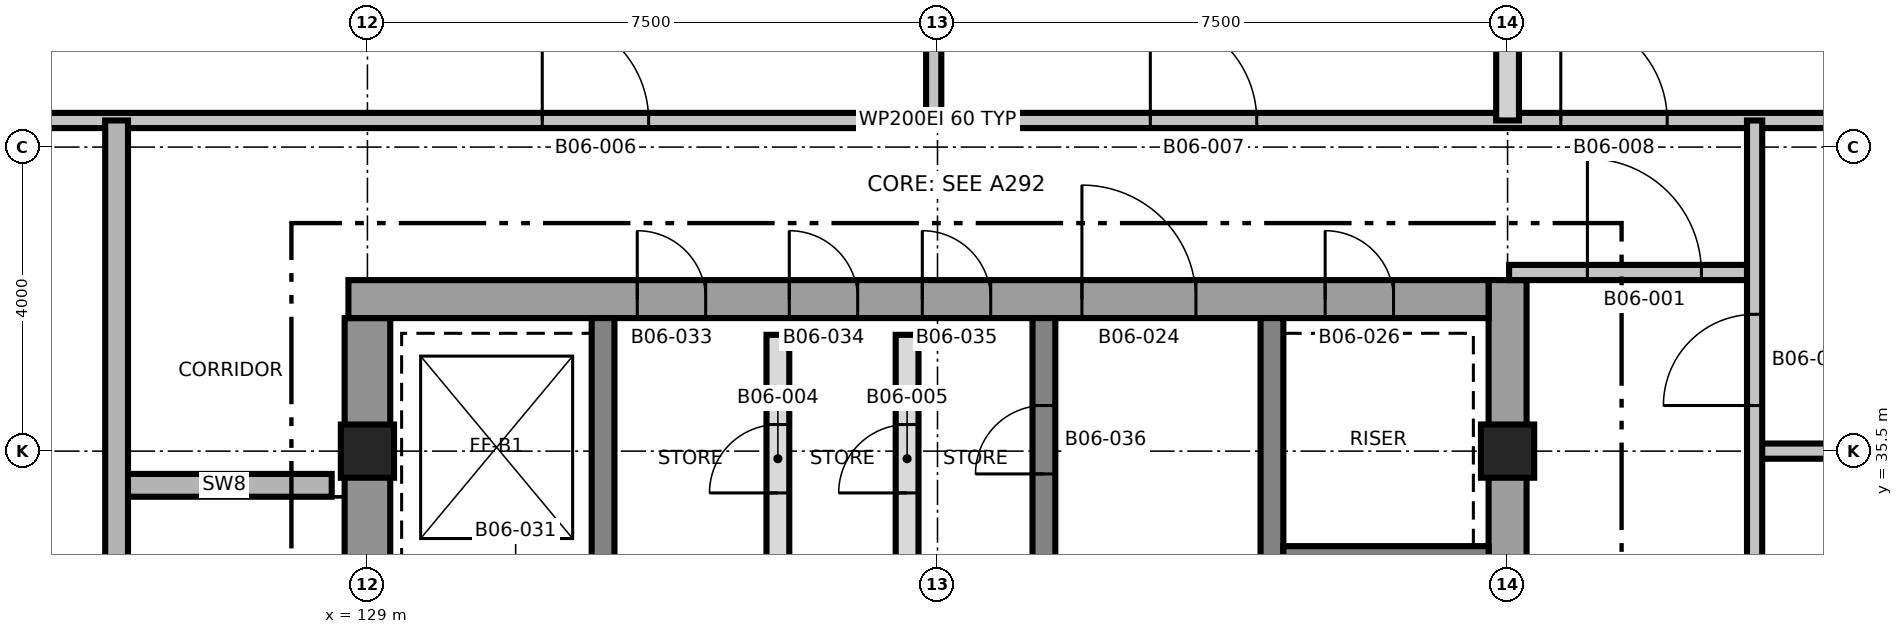
"""IFC4 building model, lengths in metres.
Left out: names, types, materials, properties, quantities, classifications, styles, units other than length and angle.
Written with IfcOpenShell. Run it as: python <this file> out.ifc"""

import sys

from ifc_helpers import new_model, si_unit, direction, frame, frame_2d, origin, origin_2d, place, context, subcontext, project, spatial, rectangle, extrude, element, fill, save


model = new_model("IFC4")
c1 = context("Model", 3, precision=1e-05, world=origin(), true_north=direction((0.0, 1.0)))
c2 = subcontext(c1, "Body", "Model", "MODEL_VIEW")
j1 = project(units=[si_unit("LENGTHUNIT", "METRE"), si_unit("PLANEANGLEUNIT", "RADIAN")], contexts=[c1])
p1 = place(None, origin())
s1 = spatial("IfcSite", under=j1, at=p1, CompositionType="ELEMENT")
p2 = place(p1, origin())
s2 = spatial("IfcBuilding", under=s1, at=p2, CompositionType="ELEMENT")
p3 = place(p2, frame((0.0, 0.0, 81.6)))
s3 = spatial("IfcBuildingStorey", under=s2, at=p3, CompositionType="ELEMENT", Elevation=81.6)
p4 = place(p3, frame((129.0, 24.75, 0.0), z_axis=(0.0, 0.0, 1.0), x_axis=(0.0, 1.0, 0.0)))
e1 = element("IfcWall", 1, at=p4, inside=s3, PredefinedType="SHEAR", context=c2, shape_type="SweptSolid", body=[
    extrude(rectangle(XDim=12.5, YDim=0.6, at=frame_2d((6.25, 0.0))), origin(), (0.0, 0.0, 1.0), 5.5),
])
p5 = place(p4, frame((5.15, 0.0, 0.0)))
e2 = element("IfcOpeningElement", 2, at=p5, cuts=e1, PredefinedType="OPENING", context=c2, shape_type="SweptSolid", body=[
    extrude(rectangle(XDim=1.0, YDim=2.1, at=frame_2d((0.5, 1.05))), frame((0.0, 0.31, 0.0), z_axis=(0.0, -1.0, 0.0), x_axis=(1.0, 0.0, 0.0)), (0.0, 0.0, 1.0), 0.62),
])
p6 = place(p3, frame((144.0, 24.25, 0.0), z_axis=(0.0, 0.0, 1.0), x_axis=(0.0, 1.0, 0.0)))
e3 = element("IfcWall", 3, at=p6, inside=s3, PredefinedType="SHEAR", context=c2, shape_type="SweptSolid", body=[
    extrude(rectangle(XDim=13.5, YDim=0.5, at=frame_2d((6.75, 0.0))), origin(), (0.0, 0.0, 1.0), 5.5),
])
p7 = place(p3, frame((128.75, 37.5, 0.0), z_axis=(0.0, 0.0, 1.0), x_axis=(1.0, 0.0, 0.0)))
e4 = element("IfcWall", 4, at=p7, inside=s3, PredefinedType="SHEAR", context=c2, shape_type="SweptSolid", body=[
    extrude(rectangle(XDim=15.0, YDim=0.5, at=frame_2d((7.5, 0.0))), origin(), (0.0, 0.0, 1.0), 5.5),
])
p8 = place(p7, frame((9.65, 0.0, 0.0)))
e5 = element("IfcOpeningElement", 5, at=p8, cuts=e4, PredefinedType="OPENING", context=c2, shape_type="SweptSolid", body=[
    extrude(rectangle(XDim=1.5, YDim=2.1, at=frame_2d((0.75, 1.05))), frame((0.0, 0.26, 0.0), z_axis=(0.0, -1.0, 0.0), x_axis=(1.0, 0.0, 0.0)), (0.0, 0.0, 1.0), 0.52),
])
p9 = place(p7, frame((12.85, 0.0, 0.0)))
e6 = element("IfcOpeningElement", 6, at=p9, cuts=e4, PredefinedType="OPENING", context=c2, shape_type="SweptSolid", body=[
    extrude(rectangle(XDim=0.9, YDim=2.1, at=frame_2d((0.45, 1.05))), frame((0.0, 0.26, 0.0), z_axis=(0.0, -1.0, 0.0), x_axis=(1.0, 0.0, 0.0)), (0.0, 0.0, 1.0), 0.52),
])
p10 = place(p7, frame((3.8, 0.0, 0.0)))
e7 = element("IfcOpeningElement", 7, at=p10, cuts=e4, PredefinedType="OPENING", context=c2, shape_type="SweptSolid", body=[
    extrude(rectangle(XDim=0.9, YDim=2.1, at=frame_2d((0.45, 1.05))), frame((0.0, 0.26, 0.0), z_axis=(0.0, -1.0, 0.0), x_axis=(1.0, 0.0, 0.0)), (0.0, 0.0, 1.0), 0.52),
])
p11 = place(p7, frame((5.8, 0.0, 0.0)))
e8 = element("IfcOpeningElement", 8, at=p11, cuts=e4, PredefinedType="OPENING", context=c2, shape_type="SweptSolid", body=[
    extrude(rectangle(XDim=0.9, YDim=2.1, at=frame_2d((0.45, 1.05))), frame((0.0, 0.26, 0.0), z_axis=(0.0, -1.0, 0.0), x_axis=(1.0, 0.0, 0.0)), (0.0, 0.0, 1.0), 0.52),
])
p12 = place(p7, frame((7.55, 0.0, 0.0)))
e9 = element("IfcOpeningElement", 9, at=p12, cuts=e4, PredefinedType="OPENING", context=c2, shape_type="SweptSolid", body=[
    extrude(rectangle(XDim=0.9, YDim=2.1, at=frame_2d((0.45, 1.05))), frame((0.0, 0.26, 0.0), z_axis=(0.0, -1.0, 0.0), x_axis=(1.0, 0.0, 0.0)), (0.0, 0.0, 1.0), 0.52),
])
p13 = place(p3, frame((132.1, 24.75, 0.0), z_axis=(0.0, 0.0, 1.0), x_axis=(0.0, 1.0, 0.0)))
e10 = element("IfcWall", 10, at=p13, inside=s3, PredefinedType="SHEAR", context=c2, shape_type="SweptSolid", body=[
    extrude(rectangle(XDim=12.5, YDim=0.3, at=frame_2d((6.25, 0.0))), origin(), (0.0, 0.0, 1.0), 5.5),
])
p14 = place(p13, frame((3.9, 0.0, 0.0)))
e11 = element("IfcOpeningElement", 11, at=p14, cuts=e10, PredefinedType="OPENING", context=c2, shape_type="SweptSolid", body=[
    extrude(rectangle(XDim=1.2, YDim=2.1, at=frame_2d((0.6, 1.05))), frame((0.0, 0.16, 0.0), z_axis=(0.0, -1.0, 0.0), x_axis=(1.0, 0.0, 0.0)), (0.0, 0.0, 1.0), 0.32),
])
p15 = place(p3, frame((137.9, 24.75, 0.0), z_axis=(0.0, 0.0, 1.0), x_axis=(0.0, 1.0, 0.0)))
e12 = element("IfcWall", 12, at=p15, inside=s3, PredefinedType="SHEAR", context=c2, shape_type="SweptSolid", body=[
    extrude(rectangle(XDim=12.5, YDim=0.3, at=frame_2d((6.25, 0.0))), origin(), (0.0, 0.0, 1.0), 5.5),
])
p16 = place(p15, frame((3.95, 0.0, 0.0)))
e13 = element("IfcOpeningElement", 13, at=p16, cuts=e12, PredefinedType="OPENING", context=c2, shape_type="SweptSolid", body=[
    extrude(rectangle(XDim=1.5, YDim=2.1, at=frame_2d((0.75, 1.05))), frame((0.0, 0.16, 0.0), z_axis=(0.0, -1.0, 0.0), x_axis=(1.0, 0.0, 0.0)), (0.0, 0.0, 1.0), 0.32),
])
p17 = place(p15, frame((10.45, 0.0, 0.0)))
e14 = element("IfcOpeningElement", 14, at=p17, cuts=e12, PredefinedType="OPENING", context=c2, shape_type="SweptSolid", body=[
    extrude(rectangle(XDim=0.9, YDim=2.1, at=frame_2d((0.45, 1.05))), frame((0.0, 0.16, 0.0), z_axis=(0.0, -1.0, 0.0), x_axis=(1.0, 0.0, 0.0)), (0.0, 0.0, 1.0), 0.32),
])
p18 = place(p3, frame((140.9, 24.75, 0.0), z_axis=(0.0, 0.0, 1.0), x_axis=(0.0, 1.0, 0.0)))
e15 = element("IfcWall", 15, at=p18, inside=s3, PredefinedType="SHEAR", context=c2, shape_type="SweptSolid", body=[
    extrude(rectangle(XDim=12.5, YDim=0.3, at=frame_2d((6.25, 0.0))), origin(), (0.0, 0.0, 1.0), 5.5),
])
p19 = place(p18, frame((5.9, 0.0, 0.0)))
e16 = element("IfcOpeningElement", 16, at=p19, cuts=e15, PredefinedType="OPENING", context=c2, shape_type="SweptSolid", body=[
    extrude(rectangle(XDim=1.2, YDim=2.1, at=frame_2d((0.6, 1.05))), frame((0.0, 0.16, 0.0), z_axis=(0.0, -1.0, 0.0), x_axis=(1.0, 0.0, 0.0)), (0.0, 0.0, 1.0), 0.32),
])
p20 = place(p3, frame((141.05, 34.1, 0.0), z_axis=(0.0, 0.0, 1.0), x_axis=(1.0, 0.0, 0.0)))
e17 = element("IfcWall", 17, at=p20, inside=s3, PredefinedType="SHEAR", context=c2, shape_type="SweptSolid", body=[
    extrude(rectangle(XDim=2.7, YDim=0.3, at=frame_2d((1.35, 0.0))), origin(), (0.0, 0.0, 1.0), 5.5),
])
for number, where, z_axis, x_axis in (
    (18, (129.0, 35.5, 0.0), (0.0, 0.0, 1.0), (1.0, 0.0, 0.0)),
    (19, (144.0, 35.5, 0.0), (0.0, 0.0, 1.0), (1.0, 0.0, 0.0)),
):
    element("IfcColumn", number, at=place(p3, frame(where, z_axis=z_axis, x_axis=x_axis)), inside=s3, PredefinedType="COLUMN", context=c2, shape_type="SweptSolid", body=[
        extrude(rectangle(XDim=0.7, YDim=0.7, at=origin_2d()), origin(), (0.0, 0.0, 1.0), 5.5),
    ])
p21 = place(p3, frame((125.7, 35.05, 0.0), z_axis=(0.0, 0.0, 1.0), x_axis=(1.0, 0.0, 0.0)))
e20 = element("IfcWall", 20, at=p21, inside=s3, PredefinedType="SHEAR", context=c2, shape_type="SweptSolid", body=[
    extrude(rectangle(XDim=2.83, YDim=0.3, at=frame_2d((1.415, 0.0))), origin(), (0.0, 0.0, 1.0), 5.2),
])
p22 = place(p3, frame((147.25, 35.5, 0.0), z_axis=(0.0, 0.0, 1.0), x_axis=(1.0, 0.0, 0.0)))
e21 = element("IfcWall", 21, at=p22, inside=s3, PredefinedType="PARTITIONING", context=c2, shape_type="SweptSolid", body=[
    extrude(rectangle(XDim=5.68, YDim=0.2, at=frame_2d((2.84, 0.0))), origin(), (0.0, 0.0, 1.0), 5.2),
])
p23 = place(p3, frame((144.02, 37.85, 0.0), z_axis=(0.0, 0.0, 1.0), x_axis=(1.0, 0.0, 0.0)))
e22 = element("IfcWall", 22, at=p23, inside=s3, PredefinedType="PARTITIONING", context=c2, shape_type="SweptSolid", body=[
    extrude(rectangle(XDim=3.23, YDim=0.2, at=frame_2d((1.615, 0.0))), origin(), (0.0, 0.0, 1.0), 5.2),
])
p24 = place(p23, frame((1.03, 0.0, 0.0)))
e23 = element("IfcOpeningElement", 23, at=p24, cuts=e22, PredefinedType="OPENING", context=c2, shape_type="SweptSolid", body=[
    extrude(rectangle(XDim=1.5, YDim=2.1, at=frame_2d((0.75, 1.05))), frame((0.0, 0.11, 0.0), z_axis=(0.0, -1.0, 0.0), x_axis=(1.0, 0.0, 0.0)), (0.0, 0.0, 1.0), 0.22),
])
p25 = place(p3, frame((120.07, 39.85, 0.0), z_axis=(0.0, 0.0, 1.0), x_axis=(1.0, 0.0, 0.0)))
e24 = element("IfcWall", 24, at=p25, inside=s3, PredefinedType="PARTITIONING", context=c2, shape_type="SweptSolid", body=[
    extrude(rectangle(XDim=32.86, YDim=0.2, at=frame_2d((16.43, 0.0))), origin(), (0.0, 0.0, 1.0), 5.2),
])
p26 = place(p25, frame((11.23, 0.0, 0.0)))
e25 = element("IfcOpeningElement", 25, at=p26, cuts=e24, PredefinedType="OPENING", context=c2, shape_type="SweptSolid", body=[
    extrude(rectangle(XDim=1.4, YDim=2.1, at=frame_2d((0.7, 1.05))), frame((0.0, 0.11, 0.0), z_axis=(0.0, -1.0, 0.0), x_axis=(1.0, 0.0, 0.0)), (0.0, 0.0, 1.0), 0.22),
])
p27 = place(p25, frame((19.23, 0.0, 0.0)))
e26 = element("IfcOpeningElement", 26, at=p27, cuts=e24, PredefinedType="OPENING", context=c2, shape_type="SweptSolid", body=[
    extrude(rectangle(XDim=1.4, YDim=2.1, at=frame_2d((0.7, 1.05))), frame((0.0, 0.11, 0.0), z_axis=(0.0, -1.0, 0.0), x_axis=(1.0, 0.0, 0.0)), (0.0, 0.0, 1.0), 0.22),
])
p28 = place(p25, frame((24.63, 0.0, 0.0)))
e27 = element("IfcOpeningElement", 27, at=p28, cuts=e24, PredefinedType="OPENING", context=c2, shape_type="SweptSolid", body=[
    extrude(rectangle(XDim=1.4, YDim=2.1, at=frame_2d((0.7, 1.05))), frame((0.0, 0.11, 0.0), z_axis=(0.0, -1.0, 0.0), x_axis=(1.0, 0.0, 0.0)), (0.0, 0.0, 1.0), 0.22),
])
p29 = place(p3, frame((125.7, 22.15, 0.0), z_axis=(0.0, 0.0, 1.0), x_axis=(0.0, 1.0, 0.0)))
e28 = element("IfcWall", 28, at=p29, inside=s3, PredefinedType="SHEAR", context=c2, shape_type="SweptSolid", body=[
    extrude(rectangle(XDim=17.7, YDim=0.3, at=frame_2d((8.85, 0.0))), origin(), (0.0, 0.0, 1.0), 5.2),
])
p30 = place(p29, frame((7.45, 0.0, 0.0)))
e29 = element("IfcOpeningElement", 29, at=p30, cuts=e28, PredefinedType="OPENING", context=c2, shape_type="SweptSolid", body=[
    extrude(rectangle(XDim=1.2, YDim=2.1, at=frame_2d((0.6, 1.05))), frame((0.0, 0.16, 0.0), z_axis=(0.0, -1.0, 0.0), x_axis=(1.0, 0.0, 0.0)), (0.0, 0.0, 1.0), 0.32),
])
p31 = place(p29, frame((3.25, 0.0, 0.0)))
e30 = element("IfcOpeningElement", 30, at=p31, cuts=e28, PredefinedType="OPENING", context=c2, shape_type="SweptSolid", body=[
    extrude(rectangle(XDim=1.2, YDim=2.1, at=frame_2d((0.6, 1.05))), frame((0.0, 0.16, 0.0), z_axis=(0.0, -1.0, 0.0), x_axis=(1.0, 0.0, 0.0)), (0.0, 0.0, 1.0), 0.32),
])
p32 = place(p3, frame((134.4, 33.77, 0.0), z_axis=(0.0, 0.0, 1.0), x_axis=(0.0, 1.0, 0.0)))
e31 = element("IfcWall", 31, at=p32, inside=s3, PredefinedType="PARTITIONING", context=c2, shape_type="SweptSolid", body=[
    extrude(rectangle(XDim=3.26, YDim=0.3, at=frame_2d((1.63, 0.0))), origin(), (0.0, 0.0, 1.0), 5.2),
])
p33 = place(p32, frame((1.18, 0.0, 0.0)))
e32 = element("IfcOpeningElement", 32, at=p33, cuts=e31, PredefinedType="OPENING", context=c2, shape_type="SweptSolid", body=[
    extrude(rectangle(XDim=0.9, YDim=2.1, at=frame_2d((0.45, 1.05))), frame((0.0, 0.16, 0.0), z_axis=(0.0, -1.0, 0.0), x_axis=(1.0, 0.0, 0.0)), (0.0, 0.0, 1.0), 0.32),
])
p34 = place(p3, frame((136.1, 33.77, 0.0), z_axis=(0.0, 0.0, 1.0), x_axis=(0.0, 1.0, 0.0)))
e33 = element("IfcWall", 33, at=p34, inside=s3, PredefinedType="PARTITIONING", context=c2, shape_type="SweptSolid", body=[
    extrude(rectangle(XDim=3.26, YDim=0.3, at=frame_2d((1.63, 0.0))), origin(), (0.0, 0.0, 1.0), 5.2),
])
p35 = place(p34, frame((1.18, 0.0, 0.0)))
e34 = element("IfcOpeningElement", 34, at=p35, cuts=e33, PredefinedType="OPENING", context=c2, shape_type="SweptSolid", body=[
    extrude(rectangle(XDim=0.9, YDim=2.1, at=frame_2d((0.45, 1.05))), frame((0.0, 0.16, 0.0), z_axis=(0.0, -1.0, 0.0), x_axis=(1.0, 0.0, 0.0)), (0.0, 0.0, 1.0), 0.32),
])
p36 = place(p3, frame((136.45, 39.85, 0.0), z_axis=(0.0, 0.0, 1.0), x_axis=(0.0, 1.0, 0.0)))
e35 = element("IfcWall", 35, at=p36, inside=s3, PredefinedType="PARTITIONING", context=c2, shape_type="SweptSolid", body=[
    extrude(rectangle(XDim=6.08, YDim=0.2, at=frame_2d((3.04, 0.0))), origin(), (0.0, 0.0, 1.0), 5.2),
])
p37 = place(p3, frame((144.0, 39.85, 0.0), z_axis=(0.0, 0.0, 1.0), x_axis=(0.0, 1.0, 0.0)))
e36 = element("IfcWall", 36, at=p37, inside=s3, PredefinedType="PARTITIONING", context=c2, shape_type="SweptSolid", body=[
    extrude(rectangle(XDim=6.08, YDim=0.3, at=frame_2d((3.04, 0.0))), origin(), (0.0, 0.0, 1.0), 5.2),
])
p38 = place(p3, frame((147.25, 22.15, 0.0), z_axis=(0.0, 0.0, 1.0), x_axis=(0.0, 1.0, 0.0)))
e37 = element("IfcWall", 37, at=p38, inside=s3, PredefinedType="PARTITIONING", context=c2, shape_type="SweptSolid", body=[
    extrude(rectangle(XDim=17.7, YDim=0.2, at=frame_2d((8.85, 0.0))), origin(), (0.0, 0.0, 1.0), 5.2),
])
p39 = place(p38, frame((2.45, 0.0, 0.0)))
e38 = element("IfcOpeningElement", 38, at=p39, cuts=e37, PredefinedType="OPENING", context=c2, shape_type="SweptSolid", body=[
    extrude(rectangle(XDim=1.2, YDim=2.1, at=frame_2d((0.6, 1.05))), frame((0.0, 0.11, 0.0), z_axis=(0.0, -1.0, 0.0), x_axis=(1.0, 0.0, 0.0)), (0.0, 0.0, 1.0), 0.22),
])
p40 = place(p38, frame((4.65, 0.0, 0.0)))
e39 = element("IfcOpeningElement", 39, at=p40, cuts=e37, PredefinedType="OPENING", context=c2, shape_type="SweptSolid", body=[
    extrude(rectangle(XDim=1.2, YDim=2.1, at=frame_2d((0.6, 1.05))), frame((0.0, 0.11, 0.0), z_axis=(0.0, -1.0, 0.0), x_axis=(1.0, 0.0, 0.0)), (0.0, 0.0, 1.0), 0.22),
])
p41 = place(p38, frame((13.95, 0.0, 0.0)))
e40 = element("IfcOpeningElement", 40, at=p41, cuts=e37, PredefinedType="OPENING", context=c2, shape_type="SweptSolid", body=[
    extrude(rectangle(XDim=1.2, YDim=2.1, at=frame_2d((0.6, 1.05))), frame((0.0, 0.11, 0.0), z_axis=(0.0, -1.0, 0.0), x_axis=(1.0, 0.0, 0.0)), (0.0, 0.0, 1.0), 0.22),
])
p42 = place(p24, origin())
e41 = element("IfcDoor", 41, at=p42, inside=s3, OperationType="SINGLE_SWING_LEFT", PredefinedType="DOOR", context=c2, shape_type="SweptSolid", body=[
    extrude(rectangle(XDim=1.5, YDim=2.1, at=frame_2d((0.75, 1.05))), frame((0.0, 0.025, 0.0), z_axis=(0.0, -1.0, 0.0), x_axis=(1.0, 0.0, 0.0)), (0.0, 0.0, 1.0), 0.05),
])
fill(e23, e41)
p43 = place(p33, origin())
e42 = element("IfcDoor", 42, at=p43, inside=s3, OperationType="SINGLE_SWING_RIGHT", PredefinedType="DOOR", context=c2, shape_type="SweptSolid", body=[
    extrude(rectangle(XDim=0.9, YDim=2.1, at=frame_2d((0.45, 1.05))), frame((0.0, 0.025, 0.0), z_axis=(0.0, -1.0, 0.0), x_axis=(1.0, 0.0, 0.0)), (0.0, 0.0, 1.0), 0.05),
])
fill(e32, e42)
p44 = place(p35, origin())
e43 = element("IfcDoor", 43, at=p44, inside=s3, OperationType="SINGLE_SWING_LEFT", PredefinedType="DOOR", context=c2, shape_type="SweptSolid", body=[
    extrude(rectangle(XDim=0.9, YDim=2.1, at=frame_2d((0.45, 1.05))), frame((0.0, 0.025, 0.0), z_axis=(0.0, -1.0, 0.0), x_axis=(1.0, 0.0, 0.0)), (0.0, 0.0, 1.0), 0.05),
])
fill(e34, e43)
p45 = place(p26, origin())
e44 = element("IfcDoor", 44, at=p45, inside=s3, OperationType="SINGLE_SWING_RIGHT", PredefinedType="DOOR", context=c2, shape_type="SweptSolid", body=[
    extrude(rectangle(XDim=1.4, YDim=2.1, at=frame_2d((0.7, 1.05))), frame((0.0, 0.025, 0.0), z_axis=(0.0, -1.0, 0.0), x_axis=(1.0, 0.0, 0.0)), (0.0, 0.0, 1.0), 0.05),
])
fill(e25, e44)
p46 = place(p27, origin())
e45 = element("IfcDoor", 45, at=p46, inside=s3, OperationType="SINGLE_SWING_LEFT", PredefinedType="DOOR", context=c2, shape_type="SweptSolid", body=[
    extrude(rectangle(XDim=1.4, YDim=2.1, at=frame_2d((0.7, 1.05))), frame((0.0, 0.025, 0.0), z_axis=(0.0, -1.0, 0.0), x_axis=(1.0, 0.0, 0.0)), (0.0, 0.0, 1.0), 0.05),
])
fill(e26, e45)
p47 = place(p28, origin())
e46 = element("IfcDoor", 46, at=p47, inside=s3, OperationType="SINGLE_SWING_RIGHT", PredefinedType="DOOR", context=c2, shape_type="SweptSolid", body=[
    extrude(rectangle(XDim=1.4, YDim=2.1, at=frame_2d((0.7, 1.05))), frame((0.0, 0.025, 0.0), z_axis=(0.0, -1.0, 0.0), x_axis=(1.0, 0.0, 0.0)), (0.0, 0.0, 1.0), 0.05),
])
fill(e27, e46)
p48 = place(p41, origin())
e47 = element("IfcDoor", 47, at=p48, inside=s3, OperationType="SINGLE_SWING_RIGHT", PredefinedType="DOOR", context=c2, shape_type="SweptSolid", body=[
    extrude(rectangle(XDim=1.2, YDim=2.1, at=frame_2d((0.6, 1.05))), frame((0.0, 0.025, 0.0), z_axis=(0.0, -1.0, 0.0), x_axis=(1.0, 0.0, 0.0)), (0.0, 0.0, 1.0), 0.05),
])
fill(e40, e47)
p49 = place(p8, origin())
e48 = element("IfcDoor", 48, at=p49, inside=s3, OperationType="SINGLE_SWING_RIGHT", PredefinedType="DOOR", context=c2, shape_type="SweptSolid", body=[
    extrude(rectangle(XDim=1.5, YDim=2.1, at=frame_2d((0.75, 1.05))), frame((0.0, 0.025, 0.0), z_axis=(0.0, -1.0, 0.0), x_axis=(1.0, 0.0, 0.0)), (0.0, 0.0, 1.0), 0.05),
])
fill(e5, e48)
p50 = place(p9, origin())
e49 = element("IfcDoor", 49, at=p50, inside=s3, OperationType="SINGLE_SWING_RIGHT", PredefinedType="DOOR", context=c2, shape_type="SweptSolid", body=[
    extrude(rectangle(XDim=0.9, YDim=2.1, at=frame_2d((0.45, 1.05))), frame((0.0, 0.025, 0.0), z_axis=(0.0, -1.0, 0.0), x_axis=(1.0, 0.0, 0.0)), (0.0, 0.0, 1.0), 0.05),
])
fill(e6, e49)
p51 = place(p10, origin())
e50 = element("IfcDoor", 50, at=p51, inside=s3, OperationType="SINGLE_SWING_LEFT", PredefinedType="DOOR", context=c2, shape_type="SweptSolid", body=[
    extrude(rectangle(XDim=0.9, YDim=2.1, at=frame_2d((0.45, 1.05))), frame((0.0, 0.025, 0.0), z_axis=(0.0, -1.0, 0.0), x_axis=(1.0, 0.0, 0.0)), (0.0, 0.0, 1.0), 0.05),
])
fill(e7, e50)
p52 = place(p11, origin())
e51 = element("IfcDoor", 51, at=p52, inside=s3, OperationType="SINGLE_SWING_RIGHT", PredefinedType="DOOR", context=c2, shape_type="SweptSolid", body=[
    extrude(rectangle(XDim=0.9, YDim=2.1, at=frame_2d((0.45, 1.05))), frame((0.0, 0.025, 0.0), z_axis=(0.0, -1.0, 0.0), x_axis=(1.0, 0.0, 0.0)), (0.0, 0.0, 1.0), 0.05),
])
fill(e8, e51)
p53 = place(p12, origin())
e52 = element("IfcDoor", 52, at=p53, inside=s3, OperationType="SINGLE_SWING_LEFT", PredefinedType="DOOR", context=c2, shape_type="SweptSolid", body=[
    extrude(rectangle(XDim=0.9, YDim=2.1, at=frame_2d((0.45, 1.05))), frame((0.0, 0.025, 0.0), z_axis=(0.0, -1.0, 0.0), x_axis=(1.0, 0.0, 0.0)), (0.0, 0.0, 1.0), 0.05),
])
fill(e9, e52)
p54 = place(p17, origin())
e53 = element("IfcDoor", 53, at=p54, inside=s3, OperationType="SINGLE_SWING_RIGHT", PredefinedType="DOOR", context=c2, shape_type="SweptSolid", body=[
    extrude(rectangle(XDim=0.9, YDim=2.1, at=frame_2d((0.45, 1.05))), frame((0.0, 0.025, 0.0), z_axis=(0.0, -1.0, 0.0), x_axis=(1.0, 0.0, 0.0)), (0.0, 0.0, 1.0), 0.05),
])
fill(e14, e53)
save(model, sys.argv[1])
